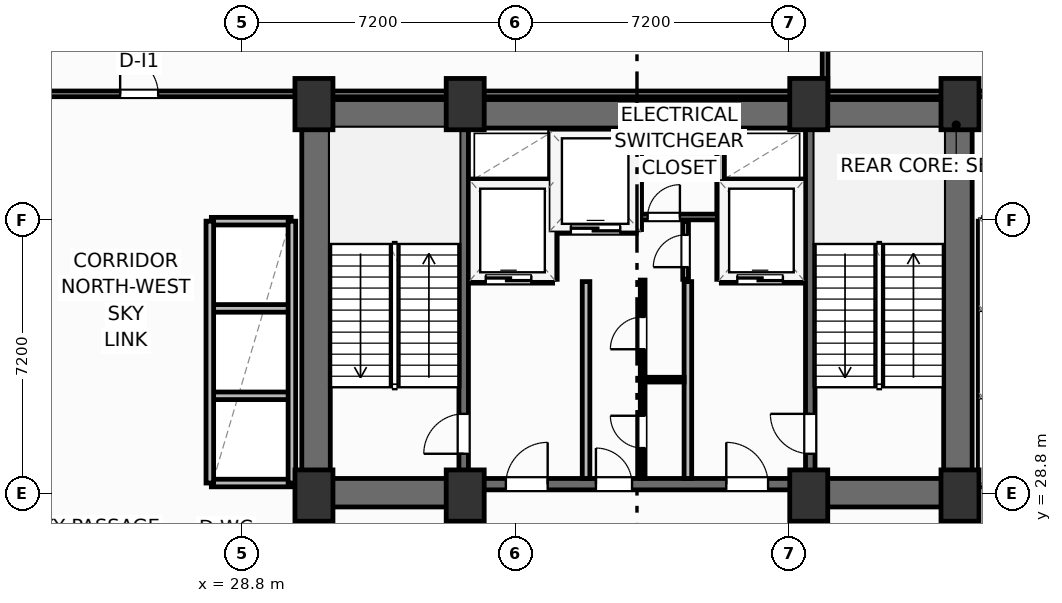
"""IFC4 building model, lengths in metres.
Left out: names, types, materials, properties, quantities, classifications, styles, units other than length and angle.
Written with IfcOpenShell. Run it as: python <this file> out.ifc"""

import sys

from ifc_helpers import new_model, si_unit, direction, frame, frame_2d, origin, origin_2d, place, context, subcontext, project, spatial, rectangle, extrude, element, fill, save


model = new_model("IFC4")
c1 = context("Model", 3, precision=1e-05, world=origin(), true_north=direction((0.0, 1.0)))
c2 = subcontext(c1, "Body", "Model", "MODEL_VIEW")
j1 = project(units=[si_unit("LENGTHUNIT", "METRE"), si_unit("PLANEANGLEUNIT", "RADIAN")], contexts=[c1])
p1 = place(None, origin())
s1 = spatial("IfcSite", under=j1, at=p1, CompositionType="ELEMENT")
p2 = place(p1, origin())
s2 = spatial("IfcBuilding", under=s1, at=p2, CompositionType="ELEMENT")
p3 = place(p2, frame((0.0, 0.0, 116.9)))
s3 = spatial("IfcBuildingStorey", under=s2, at=p3, CompositionType="ELEMENT", Elevation=116.9)
for number, where, z_axis, x_axis in (
    (1, (30.7, 28.75, 0.0), (0.0, 0.0, 1.0), (1.0, 0.0, 0.0)),
    (2, (34.68, 28.75, 0.0), (0.0, 0.0, 1.0), (1.0, 0.0, 0.0)),
    (3, (43.72, 28.75, 0.0), (0.0, 0.0, 1.0), (1.0, 0.0, 0.0)),
    (4, (47.7, 28.75, 0.0), (0.0, 0.0, 1.0), (1.0, 0.0, 0.0)),
    (5, (30.7, 39.05, 0.0), (0.0, 0.0, 1.0), (1.0, 0.0, 0.0)),
    (6, (34.68, 39.05, 0.0), (0.0, 0.0, 1.0), (1.0, 0.0, 0.0)),
    (7, (43.72, 39.05, 0.0), (0.0, 0.0, 1.0), (1.0, 0.0, 0.0)),
    (8, (47.7, 39.05, 0.0), (0.0, 0.0, 1.0), (1.0, 0.0, 0.0)),
):
    element("IfcColumn", number, at=place(p3, frame(where, z_axis=z_axis, x_axis=x_axis)), inside=s3, PredefinedType="COLUMN", context=c2, shape_type="SweptSolid", body=[
        extrude(rectangle(XDim=1.0, YDim=1.35, at=origin_2d()), origin(), (0.0, 0.0, 1.0), 4.8),
    ])
p4 = place(p3, frame((30.38, 38.795, 0.0), z_axis=(0.0, 0.0, 1.0), x_axis=(1.0, 0.0, 0.0)))
e9 = element("IfcWall", 9, at=p4, inside=s3, PredefinedType="SHEAR", context=c2, shape_type="SweptSolid", body=[
    extrude(rectangle(XDim=17.64, YDim=0.75, at=frame_2d((8.82, 0.0))), origin(), (0.0, 0.0, 1.0), 4.55),
])
for number, where, z_axis, x_axis in (
    (10, (30.755, 29.2, 0.0), (0.0, 0.0, 1.0), (0.0, 1.0, 0.0)),
    (11, (47.645, 29.2, 0.0), (0.0, 0.0, 1.0), (0.0, 1.0, 0.0)),
):
    element("IfcWall", number, at=place(p3, frame(where, z_axis=z_axis, x_axis=x_axis)), inside=s3, PredefinedType="SHEAR", context=c2, shape_type="SweptSolid", body=[
        extrude(rectangle(XDim=9.22, YDim=0.75, at=frame_2d((4.61, 0.0))), origin(), (0.0, 0.0, 1.0), 4.55),
    ])
p5 = place(p3, frame((30.38, 28.825, 0.0), z_axis=(0.0, 0.0, 1.0), x_axis=(1.0, 0.0, 0.0)))
e12 = element("IfcWall", 12, at=p5, inside=s3, PredefinedType="SHEAR", context=c2, shape_type="SweptSolid", body=[
    extrude(rectangle(XDim=4.42, YDim=0.75, at=frame_2d((2.21, 0.0))), origin(), (0.0, 0.0, 1.0), 4.55),
])
p6 = place(p3, frame((43.6, 28.825, 0.0), z_axis=(0.0, 0.0, 1.0), x_axis=(1.0, 0.0, 0.0)))
e13 = element("IfcWall", 13, at=p6, inside=s3, PredefinedType="SHEAR", context=c2, shape_type="SweptSolid", body=[
    extrude(rectangle(XDim=4.42, YDim=0.75, at=frame_2d((2.21, 0.0))), origin(), (0.0, 0.0, 1.0), 4.55),
])
p7 = place(p3, frame((34.8, 29.05, 0.0), z_axis=(0.0, 0.0, 1.0), x_axis=(1.0, 0.0, 0.0)))
e14 = element("IfcWall", 14, at=p7, inside=s3, PredefinedType="SHEAR", context=c2, shape_type="SweptSolid", body=[
    extrude(rectangle(XDim=8.8, YDim=0.3, at=frame_2d((4.4, 0.0))), origin(), (0.0, 0.0, 1.0), 4.55),
])
p8 = place(p7, frame((0.95, 0.0, 0.0)))
e15 = element("IfcOpeningElement", 15, at=p8, cuts=e14, PredefinedType="OPENING", context=c2, shape_type="SweptSolid", body=[
    extrude(rectangle(XDim=1.1, YDim=2.15, at=frame_2d((0.55, 1.075))), frame((0.0, 0.16, 0.0), z_axis=(0.0, -1.0, 0.0), x_axis=(1.0, 0.0, 0.0)), (0.0, 0.0, 1.0), 0.32),
])
p9 = place(p7, frame((6.75, 0.0, 0.0)))
e16 = element("IfcOpeningElement", 16, at=p9, cuts=e14, PredefinedType="OPENING", context=c2, shape_type="SweptSolid", body=[
    extrude(rectangle(XDim=1.1, YDim=2.15, at=frame_2d((0.55, 1.075))), frame((0.0, 0.16, 0.0), z_axis=(0.0, -1.0, 0.0), x_axis=(1.0, 0.0, 0.0)), (0.0, 0.0, 1.0), 0.32),
])
p10 = place(p7, frame((3.32, 0.0, 0.0)))
e17 = element("IfcOpeningElement", 17, at=p10, cuts=e14, PredefinedType="OPENING", context=c2, shape_type="SweptSolid", body=[
    extrude(rectangle(XDim=0.95, YDim=2.15, at=frame_2d((0.475, 1.075))), frame((0.0, 0.16, 0.0), z_axis=(0.0, -1.0, 0.0), x_axis=(1.0, 0.0, 0.0)), (0.0, 0.0, 1.0), 0.32),
])
p11 = place(p3, frame((34.64, 29.2, 0.0), z_axis=(0.0, 0.0, 1.0), x_axis=(0.0, 1.0, 0.0)))
e18 = element("IfcWall", 18, at=p11, inside=s3, PredefinedType="SHEAR", context=c2, shape_type="SweptSolid", body=[
    extrude(rectangle(XDim=9.22, YDim=0.25, at=frame_2d((4.61, 0.0))), origin(), (0.0, 0.0, 1.0), 4.55),
])
p12 = place(p11, frame((0.65, 0.0, 0.0)))
e19 = element("IfcOpeningElement", 19, at=p12, cuts=e18, PredefinedType="OPENING", context=c2, shape_type="SweptSolid", body=[
    extrude(rectangle(XDim=1.05, YDim=2.15, at=frame_2d((0.525, 1.075))), frame((0.0, 0.135, 0.0), z_axis=(0.0, -1.0, 0.0), x_axis=(1.0, 0.0, 0.0)), (0.0, 0.0, 1.0), 0.27),
])
p13 = place(p3, frame((43.76, 29.2, 0.0), z_axis=(0.0, 0.0, 1.0), x_axis=(0.0, 1.0, 0.0)))
e20 = element("IfcWall", 20, at=p13, inside=s3, PredefinedType="SHEAR", context=c2, shape_type="SweptSolid", body=[
    extrude(rectangle(XDim=9.22, YDim=0.25, at=frame_2d((4.61, 0.0))), origin(), (0.0, 0.0, 1.0), 4.55),
])
p14 = place(p13, frame((0.65, 0.0, 0.0)))
e21 = element("IfcOpeningElement", 21, at=p14, cuts=e20, PredefinedType="OPENING", context=c2, shape_type="SweptSolid", body=[
    extrude(rectangle(XDim=1.05, YDim=2.15, at=frame_2d((0.525, 1.075))), frame((0.0, 0.135, 0.0), z_axis=(0.0, -1.0, 0.0), x_axis=(1.0, 0.0, 0.0)), (0.0, 0.0, 1.0), 0.27),
])
p15 = place(p3, frame((10.0, 39.32, 0.0), z_axis=(0.0, 0.0, 1.0), x_axis=(1.0, 0.0, 0.0)))
e22 = element("IfcWall", 22, at=p15, inside=s3, PredefinedType="PARTITIONING", context=c2, shape_type="SweptSolid", body=[
    extrude(rectangle(XDim=62.0, YDim=0.15, at=frame_2d((31.0, 0.0))), origin(), (0.0, 0.0, 1.0), 4.55),
])
p16 = place(p15, frame((15.6, 0.0, 0.0)))
e23 = element("IfcOpeningElement", 23, at=p16, cuts=e22, PredefinedType="OPENING", context=c2, shape_type="SweptSolid", body=[
    extrude(rectangle(XDim=1.0, YDim=2.05, at=frame_2d((0.5, 1.025))), frame((0.0, 0.085, 0.0), z_axis=(0.0, -1.0, 0.0), x_axis=(1.0, 0.0, 0.0)), (0.0, 0.0, 1.0), 0.17),
])
p17 = place(p15, frame((39.5, 0.0, 0.0)))
e24 = element("IfcOpeningElement", 24, at=p17, cuts=e22, PredefinedType="OPENING", context=c2, shape_type="SweptSolid", body=[
    extrude(rectangle(XDim=2.0, YDim=2.05, at=frame_2d((1.0, 1.025))), frame((0.0, 0.085, 0.0), z_axis=(0.0, -1.0, 0.0), x_axis=(1.0, 0.0, 0.0)), (0.0, 0.0, 1.0), 0.17),
])
p18 = place(p3, frame((44.15, 39.32, 0.0), z_axis=(0.0, 0.0, 1.0), x_axis=(0.0, 1.0, 0.0)))
e25 = element("IfcWall", 25, at=p18, inside=s3, PredefinedType="PARTITIONING", context=c2, shape_type="SweptSolid", body=[
    extrude(rectangle(XDim=6.594, YDim=0.15, at=frame_2d((3.297, 0.0))), origin(), (0.0, 0.0, 1.0), 4.55),
])
for number, where, z_axis, x_axis in (
    (26, (37.86, 29.2, 0.0), (0.0, 0.0, 1.0), (0.0, 1.0, 0.0)),
    (27, (40.54, 29.2, 0.0), (0.0, 0.0, 1.0), (0.0, 1.0, 0.0)),
):
    element("IfcWall", number, at=place(p3, frame(where, z_axis=z_axis, x_axis=x_axis)), inside=s3, PredefinedType="PARTITIONING", context=c2, shape_type="SweptSolid", body=[
        extrude(rectangle(XDim=5.18, YDim=0.2, at=frame_2d((2.59, 0.0))), origin(), (0.0, 0.0, 1.0), 4.55),
    ])
p19 = place(p3, frame((34.8, 34.44, 0.0), z_axis=(0.0, 0.0, 1.0), x_axis=(1.0, 0.0, 0.0)))
e28 = element("IfcWall", 28, at=p19, inside=s3, PredefinedType="PARTITIONING", context=c2, shape_type="SweptSolid", body=[
    extrude(rectangle(XDim=2.18, YDim=0.2, at=frame_2d((1.09, 0.0))), origin(), (0.0, 0.0, 1.0), 4.55),
])
p20 = place(p19, frame((0.42, 0.0, 0.0)))
e29 = element("IfcOpeningElement", 29, at=p20, cuts=e28, PredefinedType="OPENING", context=c2, shape_type="SweptSolid", body=[
    extrude(rectangle(XDim=1.2, YDim=2.2, at=frame_2d((0.6, 1.1))), frame((0.0, 0.11, 0.0), z_axis=(0.0, -1.0, 0.0), x_axis=(1.0, 0.0, 0.0)), (0.0, 0.0, 1.0), 0.22),
])
p21 = place(p3, frame((34.8, 36.98, 0.0), z_axis=(0.0, 0.0, 1.0), x_axis=(1.0, 0.0, 0.0)))
e30 = element("IfcWall", 30, at=p21, inside=s3, PredefinedType="PARTITIONING", context=c2, shape_type="SweptSolid", body=[
    extrude(rectangle(XDim=2.18, YDim=0.2, at=frame_2d((1.09, 0.0))), origin(), (0.0, 0.0, 1.0), 4.55),
])
p22 = place(p3, frame((37.0, 34.44, 0.0), z_axis=(0.0, 0.0, 1.0), x_axis=(0.0, 1.0, 0.0)))
e31 = element("IfcWall", 31, at=p22, inside=s3, PredefinedType="PARTITIONING", context=c2, shape_type="SweptSolid", body=[
    extrude(rectangle(XDim=3.9, YDim=0.2, at=frame_2d((1.95, 0.0))), origin(), (0.0, 0.0, 1.0), 4.55),
])
p23 = place(p3, frame((41.42, 34.44, 0.0), z_axis=(0.0, 0.0, 1.0), x_axis=(1.0, 0.0, 0.0)))
e32 = element("IfcWall", 32, at=p23, inside=s3, PredefinedType="PARTITIONING", context=c2, shape_type="SweptSolid", body=[
    extrude(rectangle(XDim=2.18, YDim=0.2, at=frame_2d((1.09, 0.0))), origin(), (0.0, 0.0, 1.0), 4.55),
])
p24 = place(p23, frame((0.42, 0.0, 0.0)))
e33 = element("IfcOpeningElement", 33, at=p24, cuts=e32, PredefinedType="OPENING", context=c2, shape_type="SweptSolid", body=[
    extrude(rectangle(XDim=1.2, YDim=2.2, at=frame_2d((0.6, 1.1))), frame((0.0, 0.11, 0.0), z_axis=(0.0, -1.0, 0.0), x_axis=(1.0, 0.0, 0.0)), (0.0, 0.0, 1.0), 0.22),
])
p25 = place(p3, frame((41.42, 36.98, 0.0), z_axis=(0.0, 0.0, 1.0), x_axis=(1.0, 0.0, 0.0)))
e34 = element("IfcWall", 34, at=p25, inside=s3, PredefinedType="PARTITIONING", context=c2, shape_type="SweptSolid", body=[
    extrude(rectangle(XDim=2.18, YDim=0.2, at=frame_2d((1.09, 0.0))), origin(), (0.0, 0.0, 1.0), 4.55),
])
p26 = place(p3, frame((41.4, 34.44, 0.0), z_axis=(0.0, 0.0, 1.0), x_axis=(0.0, 1.0, 0.0)))
e35 = element("IfcWall", 35, at=p26, inside=s3, PredefinedType="PARTITIONING", context=c2, shape_type="SweptSolid", body=[
    extrude(rectangle(XDim=3.9, YDim=0.2, at=frame_2d((1.95, 0.0))), origin(), (0.0, 0.0, 1.0), 4.55),
])
p27 = place(p3, frame((37.06, 35.75, 0.0), z_axis=(0.0, 0.0, 1.0), x_axis=(1.0, 0.0, 0.0)))
e36 = element("IfcWall", 36, at=p27, inside=s3, PredefinedType="PARTITIONING", context=c2, shape_type="SweptSolid", body=[
    extrude(rectangle(XDim=2.12, YDim=0.2, at=frame_2d((1.06, 0.0))), origin(), (0.0, 0.0, 1.0), 4.55),
])
p28 = place(p27, frame((0.4, 0.0, 0.0)))
e37 = element("IfcOpeningElement", 37, at=p28, cuts=e36, PredefinedType="OPENING", context=c2, shape_type="SweptSolid", body=[
    extrude(rectangle(XDim=1.3, YDim=2.2, at=frame_2d((0.65, 1.1))), frame((0.0, 0.11, 0.0), z_axis=(0.0, -1.0, 0.0), x_axis=(1.0, 0.0, 0.0)), (0.0, 0.0, 1.0), 0.22),
])
p29 = place(p3, frame((39.22, 35.75, 0.0), z_axis=(0.0, 0.0, 1.0), x_axis=(0.0, 1.0, 0.0)))
e38 = element("IfcWall", 38, at=p29, inside=s3, PredefinedType="PARTITIONING", context=c2, shape_type="SweptSolid", body=[
    extrude(rectangle(XDim=2.59, YDim=0.2, at=frame_2d((1.295, 0.0))), origin(), (0.0, 0.0, 1.0), 4.55),
])
p30 = place(p3, frame((39.3, 36.08, 0.0), z_axis=(0.0, 0.0, 1.0), x_axis=(1.0, 0.0, 0.0)))
e39 = element("IfcWall", 39, at=p30, inside=s3, PredefinedType="PARTITIONING", context=c2, shape_type="SweptSolid", body=[
    extrude(rectangle(XDim=2.02, YDim=0.15, at=frame_2d((1.01, 0.0))), origin(), (0.0, 0.0, 1.0), 4.55),
])
p31 = place(p30, frame((0.18, 0.0, 0.0)))
e40 = element("IfcOpeningElement", 40, at=p31, cuts=e39, PredefinedType="OPENING", context=c2, shape_type="SweptSolid", body=[
    extrude(rectangle(XDim=0.85, YDim=2.05, at=frame_2d((0.425, 1.025))), frame((0.0, 0.085, 0.0), z_axis=(0.0, -1.0, 0.0), x_axis=(1.0, 0.0, 0.0)), (0.0, 0.0, 1.0), 0.17),
])
p32 = place(p3, frame((40.48, 34.44, 0.0), z_axis=(0.0, 0.0, 1.0), x_axis=(0.0, 1.0, 0.0)))
e41 = element("IfcWall", 41, at=p32, inside=s3, PredefinedType="PARTITIONING", context=c2, shape_type="SweptSolid", body=[
    extrude(rectangle(XDim=1.52, YDim=0.15, at=frame_2d((0.76, 0.0))), origin(), (0.0, 0.0, 1.0), 4.55),
])
p33 = place(p32, frame((0.32, 0.0, 0.0)))
e42 = element("IfcOpeningElement", 42, at=p33, cuts=e41, PredefinedType="OPENING", context=c2, shape_type="SweptSolid", body=[
    extrude(rectangle(XDim=0.85, YDim=2.05, at=frame_2d((0.425, 1.025))), frame((0.0, 0.085, 0.0), z_axis=(0.0, -1.0, 0.0), x_axis=(1.0, 0.0, 0.0)), (0.0, 0.0, 1.0), 0.17),
])
p34 = place(p3, frame((39.35, 31.8, 0.0), z_axis=(0.0, 0.0, 1.0), x_axis=(1.0, 0.0, 0.0)))
e43 = element("IfcWall", 43, at=p34, inside=s3, PredefinedType="PARTITIONING", context=c2, shape_type="SweptSolid", body=[
    extrude(rectangle(XDim=1.09, YDim=0.125, at=frame_2d((0.545, 0.0))), origin(), (0.0, 0.0, 1.0), 4.55),
])
p35 = place(p3, frame((39.35, 29.2, 0.0), z_axis=(0.0, 0.0, 1.0), x_axis=(0.0, 1.0, 0.0)))
e44 = element("IfcWall", 44, at=p35, inside=s3, PredefinedType="PARTITIONING", context=c2, shape_type="SweptSolid", body=[
    extrude(rectangle(XDim=5.22, YDim=0.125, at=frame_2d((2.61, 0.0))), origin(), (0.0, 0.0, 1.0), 4.55),
])
p36 = place(p35, frame((0.8, 0.0, 0.0)))
e45 = element("IfcOpeningElement", 45, at=p36, cuts=e44, PredefinedType="OPENING", context=c2, shape_type="SweptSolid", body=[
    extrude(rectangle(XDim=0.85, YDim=2.05, at=frame_2d((0.425, 1.025))), frame((0.0, 0.073, 0.0), z_axis=(0.0, -1.0, 0.0), x_axis=(1.0, 0.0, 0.0)), (0.0, 0.0, 1.0), 0.145),
])
p37 = place(p35, frame((3.4, 0.0, 0.0)))
e46 = element("IfcOpeningElement", 46, at=p37, cuts=e44, PredefinedType="OPENING", context=c2, shape_type="SweptSolid", body=[
    extrude(rectangle(XDim=0.85, YDim=2.05, at=frame_2d((0.425, 1.025))), frame((0.0, 0.073, 0.0), z_axis=(0.0, -1.0, 0.0), x_axis=(1.0, 0.0, 0.0)), (0.0, 0.0, 1.0), 0.145),
])
for number, where, z_axis, x_axis in (
    (47, (28.02, 31.375, 0.0), (0.0, 0.0, 1.0), (1.0, 0.0, 0.0)),
    (48, (28.02, 33.675, 0.0), (0.0, 0.0, 1.0), (1.0, 0.0, 0.0)),
):
    element("IfcWall", number, at=place(p3, frame(where, z_axis=z_axis, x_axis=x_axis)), inside=s3, PredefinedType="PARTITIONING", context=c2, shape_type="SweptSolid", body=[
        extrude(rectangle(XDim=2.06, YDim=0.2, at=frame_2d((1.03, 0.0))), origin(), (0.0, 0.0, 1.0), 4.55),
    ])
for number, where, z_axis, x_axis in (
    (49, (28.0, 29.08, 0.0), (0.0, 0.0, 1.0), (1.0, 0.0, 0.0)),
    (50, (28.0, 35.97, 0.0), (0.0, 0.0, 1.0), (1.0, 0.0, 0.0)),
):
    element("IfcWall", number, at=place(p3, frame(where, z_axis=z_axis, x_axis=x_axis)), inside=s3, PredefinedType="PARTITIONING", context=c2, shape_type="SweptSolid", body=[
        extrude(rectangle(XDim=2.1, YDim=0.2, at=frame_2d((1.05, 0.0))), origin(), (0.0, 0.0, 1.0), 4.55),
    ])
for number, where, z_axis, x_axis in (
    (51, (30.12, 29.08, 0.0), (0.0, 0.0, 1.0), (0.0, 1.0, 0.0)),
    (52, (27.96, 29.08, 0.0), (0.0, 0.0, 1.0), (0.0, 1.0, 0.0)),
    (53, (48.28, 29.08, 0.0), (0.0, 0.0, 1.0), (0.0, 1.0, 0.0)),
):
    element("IfcWall", number, at=place(p3, frame(where, z_axis=z_axis, x_axis=x_axis)), inside=s3, PredefinedType="PARTITIONING", context=c2, shape_type="SweptSolid", body=[
        extrude(rectangle(XDim=6.89, YDim=0.2, at=frame_2d((3.445, 0.0))), origin(), (0.0, 0.0, 1.0), 4.55),
    ])
p38 = place(p16, origin())
e54 = element("IfcDoor", 54, at=p38, inside=s3, OperationType="SINGLE_SWING_LEFT", PredefinedType="DOOR", context=c2, shape_type="SweptSolid", body=[
    extrude(rectangle(XDim=1.0, YDim=2.05, at=frame_2d((0.5, 1.025))), frame((0.0, 0.025, 0.0), z_axis=(0.0, -1.0, 0.0), x_axis=(1.0, 0.0, 0.0)), (0.0, 0.0, 1.0), 0.05),
])
fill(e23, e54)
p39 = place(p12, origin())
e55 = element("IfcDoor", 55, at=p39, inside=s3, OperationType="SINGLE_SWING_LEFT", PredefinedType="DOOR", context=c2, shape_type="SweptSolid", body=[
    extrude(rectangle(XDim=1.05, YDim=2.15, at=frame_2d((0.525, 1.075))), frame((0.0, 0.025, 0.0), z_axis=(0.0, -1.0, 0.0), x_axis=(1.0, 0.0, 0.0)), (0.0, 0.0, 1.0), 0.05),
])
fill(e19, e55)
p40 = place(p14, origin())
e56 = element("IfcDoor", 56, at=p40, inside=s3, OperationType="SINGLE_SWING_RIGHT", PredefinedType="DOOR", context=c2, shape_type="SweptSolid", body=[
    extrude(rectangle(XDim=1.05, YDim=2.15, at=frame_2d((0.525, 1.075))), frame((0.0, 0.025, 0.0), z_axis=(0.0, -1.0, 0.0), x_axis=(1.0, 0.0, 0.0)), (0.0, 0.0, 1.0), 0.05),
])
fill(e21, e56)
p41 = place(p8, origin())
e57 = element("IfcDoor", 57, at=p41, inside=s3, OperationType="SINGLE_SWING_RIGHT", PredefinedType="DOOR", context=c2, shape_type="SweptSolid", body=[
    extrude(rectangle(XDim=1.1, YDim=2.15, at=frame_2d((0.55, 1.075))), frame((0.0, 0.025, 0.0), z_axis=(0.0, -1.0, 0.0), x_axis=(1.0, 0.0, 0.0)), (0.0, 0.0, 1.0), 0.05),
])
fill(e15, e57)
p42 = place(p9, origin())
e58 = element("IfcDoor", 58, at=p42, inside=s3, OperationType="SINGLE_SWING_LEFT", PredefinedType="DOOR", context=c2, shape_type="SweptSolid", body=[
    extrude(rectangle(XDim=1.1, YDim=2.15, at=frame_2d((0.55, 1.075))), frame((0.0, 0.025, 0.0), z_axis=(0.0, -1.0, 0.0), x_axis=(1.0, 0.0, 0.0)), (0.0, 0.0, 1.0), 0.05),
])
fill(e16, e58)
p43 = place(p20, origin())
e59 = element("IfcDoor", 59, at=p43, inside=s3, OperationType="SLIDING_TO_LEFT", PredefinedType="DOOR", context=c2, shape_type="SweptSolid", body=[
    extrude(rectangle(XDim=1.2, YDim=2.2, at=frame_2d((0.6, 1.1))), frame((0.0, 0.025, 0.0), z_axis=(0.0, -1.0, 0.0), x_axis=(1.0, 0.0, 0.0)), (0.0, 0.0, 1.0), 0.05),
])
fill(e29, e59)
p44 = place(p24, origin())
e60 = element("IfcDoor", 60, at=p44, inside=s3, OperationType="SLIDING_TO_LEFT", PredefinedType="DOOR", context=c2, shape_type="SweptSolid", body=[
    extrude(rectangle(XDim=1.2, YDim=2.2, at=frame_2d((0.6, 1.1))), frame((0.0, 0.025, 0.0), z_axis=(0.0, -1.0, 0.0), x_axis=(1.0, 0.0, 0.0)), (0.0, 0.0, 1.0), 0.05),
])
fill(e33, e60)
p45 = place(p28, origin())
e61 = element("IfcDoor", 61, at=p45, inside=s3, OperationType="SLIDING_TO_LEFT", PredefinedType="DOOR", context=c2, shape_type="SweptSolid", body=[
    extrude(rectangle(XDim=1.3, YDim=2.2, at=frame_2d((0.65, 1.1))), frame((0.0, 0.025, 0.0), z_axis=(0.0, -1.0, 0.0), x_axis=(1.0, 0.0, 0.0)), (0.0, 0.0, 1.0), 0.05),
])
fill(e37, e61)
p46 = place(p31, origin())
e62 = element("IfcDoor", 62, at=p46, inside=s3, OperationType="SINGLE_SWING_RIGHT", PredefinedType="DOOR", context=c2, shape_type="SweptSolid", body=[
    extrude(rectangle(XDim=0.85, YDim=2.05, at=frame_2d((0.425, 1.025))), frame((0.0, 0.025, 0.0), z_axis=(0.0, -1.0, 0.0), x_axis=(1.0, 0.0, 0.0)), (0.0, 0.0, 1.0), 0.05),
])
fill(e40, e62)
p47 = place(p33, origin())
e63 = element("IfcDoor", 63, at=p47, inside=s3, OperationType="SINGLE_SWING_LEFT", PredefinedType="DOOR", context=c2, shape_type="SweptSolid", body=[
    extrude(rectangle(XDim=0.85, YDim=2.05, at=frame_2d((0.425, 1.025))), frame((0.0, 0.025, 0.0), z_axis=(0.0, -1.0, 0.0), x_axis=(1.0, 0.0, 0.0)), (0.0, 0.0, 1.0), 0.05),
])
fill(e42, e63)
p48 = place(p36, origin())
e64 = element("IfcDoor", 64, at=p48, inside=s3, OperationType="SINGLE_SWING_RIGHT", PredefinedType="DOOR", context=c2, shape_type="SweptSolid", body=[
    extrude(rectangle(XDim=0.85, YDim=2.05, at=frame_2d((0.425, 1.025))), frame((0.0, 0.025, 0.0), z_axis=(0.0, -1.0, 0.0), x_axis=(1.0, 0.0, 0.0)), (0.0, 0.0, 1.0), 0.05),
])
fill(e45, e64)
p49 = place(p37, origin())
e65 = element("IfcDoor", 65, at=p49, inside=s3, OperationType="SINGLE_SWING_LEFT", PredefinedType="DOOR", context=c2, shape_type="SweptSolid", body=[
    extrude(rectangle(XDim=0.85, YDim=2.05, at=frame_2d((0.425, 1.025))), frame((0.0, 0.025, 0.0), z_axis=(0.0, -1.0, 0.0), x_axis=(1.0, 0.0, 0.0)), (0.0, 0.0, 1.0), 0.05),
])
fill(e46, e65)
p50 = place(p10, origin())
e66 = element("IfcDoor", 66, at=p50, inside=s3, OperationType="SINGLE_SWING_LEFT", PredefinedType="DOOR", context=c2, shape_type="SweptSolid", body=[
    extrude(rectangle(XDim=0.95, YDim=2.15, at=frame_2d((0.475, 1.075))), frame((0.0, 0.025, 0.0), z_axis=(0.0, -1.0, 0.0), x_axis=(1.0, 0.0, 0.0)), (0.0, 0.0, 1.0), 0.05),
])
fill(e17, e66)
save(model, sys.argv[1])
